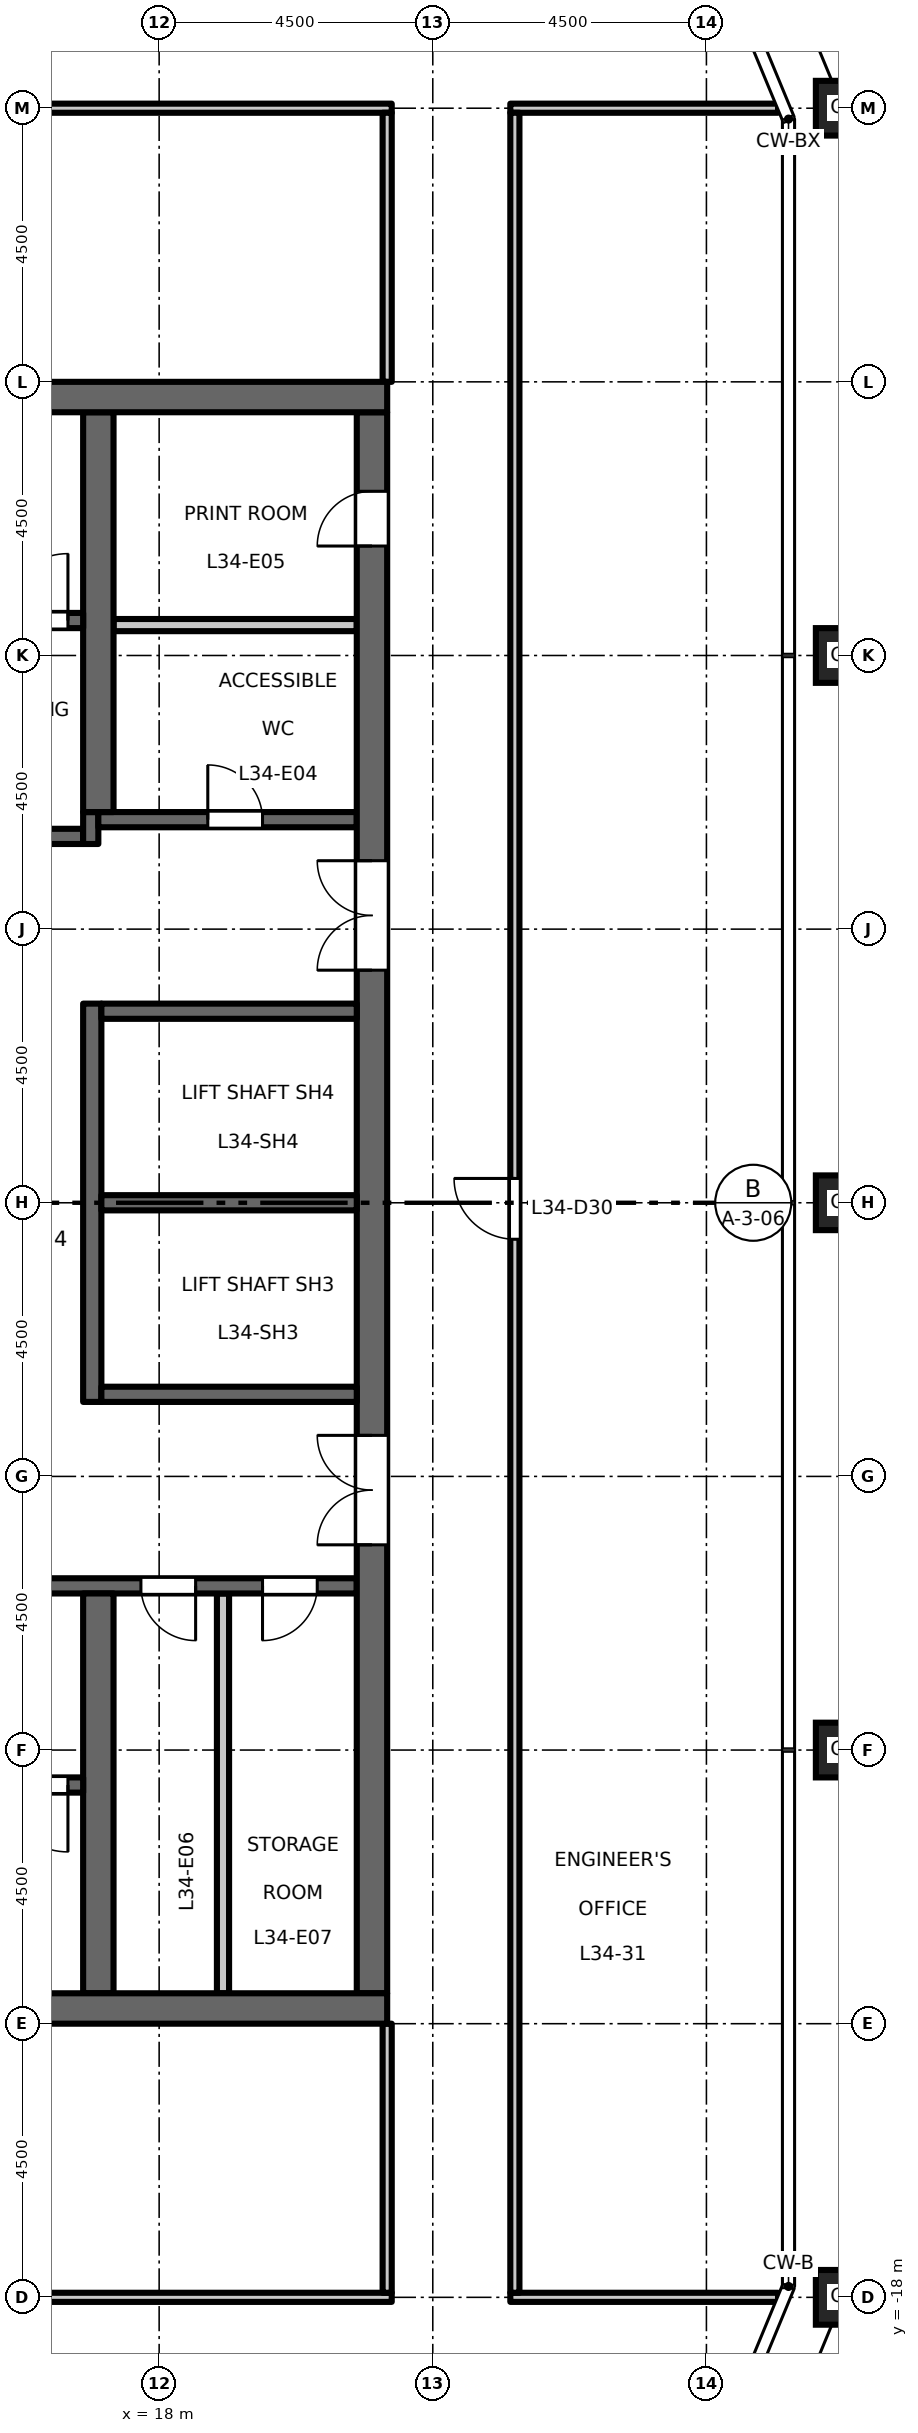
"""IFC4 building model, lengths in metres.
Left out: names, types, materials, properties, quantities, classifications, styles, units other than length and angle.
Written with IfcOpenShell. Run it as: python <this file> out.ifc"""

import sys

from ifc_helpers import new_model, si_unit, direction, frame, frame_2d, origin, origin_2d, place, context, subcontext, project, spatial, rectangle, hollow_rectangle, extrude, element, fill, save


model = new_model("IFC4")
c1 = context("Model", 3, precision=1e-05, world=origin(), true_north=direction((0.0, 1.0)))
c2 = subcontext(c1, "Body", "Model", "MODEL_VIEW")
j1 = project(units=[si_unit("LENGTHUNIT", "METRE"), si_unit("PLANEANGLEUNIT", "RADIAN")], contexts=[c1])
p1 = place(None, origin())
s1 = spatial("IfcSite", under=j1, at=p1, CompositionType="ELEMENT")
p2 = place(p1, origin())
s2 = spatial("IfcBuilding", under=s1, at=p2, CompositionType="ELEMENT")
p3 = place(p2, frame((0.0, 0.0, 158.7)))
s3 = spatial("IfcBuildingStorey", under=s2, at=p3, CompositionType="ELEMENT", Elevation=158.7)
for number, where, z_axis, x_axis in (
    (1, (29.25, -18.0, 0.0), (0.0, 0.0, 1.0), (1.0, 0.0, 0.0)),
    (2, (29.25, -9.0, 0.0), (0.0, 0.0, 1.0), (1.0, 0.0, 0.0)),
    (3, (29.25, 0.0, 0.0), (0.0, 0.0, 1.0), (1.0, 0.0, 0.0)),
    (4, (29.25, 9.0, 0.0), (0.0, 0.0, 1.0), (1.0, 0.0, 0.0)),
    (5, (29.25, 18.0, 0.0), (0.0, 0.0, 1.0), (1.0, 0.0, 0.0)),
):
    element("IfcColumn", number, at=place(p3, frame(where, z_axis=z_axis, x_axis=x_axis)), inside=s3, PredefinedType="COLUMN", context=c2, shape_type="SweptSolid", body=[
        extrude(hollow_rectangle(XDim=0.9, YDim=0.9, WallThickness=0.05, at=origin_2d()), origin(), (0.0, 0.0, 1.0), 4.5),
    ])
p4 = place(p3, frame((12.15, 6.025, 0.0), z_axis=(0.0, 0.0, 1.0), x_axis=(1.0, 0.0, 0.0)))
e6 = element("IfcWall", 6, at=p4, inside=s3, PredefinedType="SHEAR", context=c2, shape_type="SweptSolid", body=[
    extrude(rectangle(XDim=4.6, YDim=0.25, at=frame_2d((2.3, 0.0))), origin(), (0.0, 0.0, 1.0), 4.35),
])
p5 = place(p4, frame((1.8, 0.0, 0.0)))
e7 = element("IfcOpeningElement", 7, at=p5, cuts=e6, PredefinedType="OPENING", context=c2, shape_type="SweptSolid", body=[
    extrude(rectangle(XDim=1.0, YDim=2.1, at=frame_2d((0.5, 1.05))), frame((0.0, 0.135, 0.0), z_axis=(0.0, -1.0, 0.0), x_axis=(1.0, 0.0, 0.0)), (0.0, 0.0, 1.0), 0.27),
])
p6 = place(p3, frame((16.875, 5.9, 0.0), z_axis=(0.0, 0.0, 1.0), x_axis=(0.0, 1.0, 0.0)))
e8 = element("IfcWall", 8, at=p6, inside=s3, PredefinedType="SHEAR", context=c2, shape_type="SweptSolid", body=[
    extrude(rectangle(XDim=0.525, YDim=0.25, at=frame_2d((0.263, 0.0))), origin(), (0.0, 0.0, 1.0), 4.35),
])
p7 = place(p3, frame((17.0, 6.3, 0.0), z_axis=(0.0, 0.0, 1.0), x_axis=(1.0, 0.0, 0.0)))
e9 = element("IfcWall", 9, at=p7, inside=s3, PredefinedType="SHEAR", context=c2, shape_type="SweptSolid", body=[
    extrude(rectangle(XDim=4.25, YDim=0.25, at=frame_2d((2.125, 0.0))), origin(), (0.0, 0.0, 1.0), 4.35),
])
p8 = place(p7, frame((1.8, 0.0, 0.0)))
e10 = element("IfcOpeningElement", 10, at=p8, cuts=e9, PredefinedType="OPENING", context=c2, shape_type="SweptSolid", body=[
    extrude(rectangle(XDim=0.9, YDim=2.1, at=frame_2d((0.45, 1.05))), frame((0.0, 0.135, 0.0), z_axis=(0.0, -1.0, 0.0), x_axis=(1.0, 0.0, 0.0)), (0.0, 0.0, 1.0), 0.27),
])
p9 = place(p3, frame((12.15, -6.3, 0.0), z_axis=(0.0, 0.0, 1.0), x_axis=(1.0, 0.0, 0.0)))
e11 = element("IfcWall", 11, at=p9, inside=s3, PredefinedType="SHEAR", context=c2, shape_type="SweptSolid", body=[
    extrude(rectangle(XDim=9.1, YDim=0.25, at=frame_2d((4.55, 0.0))), origin(), (0.0, 0.0, 1.0), 4.35),
])
p10 = place(p9, frame((1.8, 0.0, 0.0)))
e12 = element("IfcOpeningElement", 12, at=p10, cuts=e11, PredefinedType="OPENING", context=c2, shape_type="SweptSolid", body=[
    extrude(rectangle(XDim=1.0, YDim=2.1, at=frame_2d((0.5, 1.05))), frame((0.0, 0.135, 0.0), z_axis=(0.0, -1.0, 0.0), x_axis=(1.0, 0.0, 0.0)), (0.0, 0.0, 1.0), 0.27),
])
p11 = place(p9, frame((5.55, 0.0, 0.0)))
e13 = element("IfcOpeningElement", 13, at=p11, cuts=e11, PredefinedType="OPENING", context=c2, shape_type="SweptSolid", body=[
    extrude(rectangle(XDim=0.9, YDim=2.1, at=frame_2d((0.45, 1.05))), frame((0.0, 0.135, 0.0), z_axis=(0.0, -1.0, 0.0), x_axis=(1.0, 0.0, 0.0)), (0.0, 0.0, 1.0), 0.27),
])
p12 = place(p9, frame((7.55, 0.0, 0.0)))
e14 = element("IfcOpeningElement", 14, at=p12, cuts=e11, PredefinedType="OPENING", context=c2, shape_type="SweptSolid", body=[
    extrude(rectangle(XDim=0.9, YDim=2.1, at=frame_2d((0.45, 1.05))), frame((0.0, 0.135, 0.0), z_axis=(0.0, -1.0, 0.0), x_axis=(1.0, 0.0, 0.0)), (0.0, 0.0, 1.0), 0.27),
])
p13 = place(p3, frame((21.5, -13.0, 0.0), z_axis=(0.0, 0.0, 1.0), x_axis=(0.0, 1.0, 0.0)))
e15 = element("IfcWall", 15, at=p13, inside=s3, PredefinedType="SHEAR", context=c2, shape_type="SweptSolid", body=[
    extrude(rectangle(XDim=26.0, YDim=0.5, at=frame_2d((13.0, 0.0))), origin(), (0.0, 0.0, 1.0), 4.35),
])
p14 = place(p13, frame((16.825, 0.0, 0.0)))
e16 = element("IfcOpeningElement", 16, at=p14, cuts=e15, PredefinedType="OPENING", context=c2, shape_type="SweptSolid", body=[
    extrude(rectangle(XDim=1.8, YDim=2.1, at=frame_2d((0.9, 1.05))), frame((0.0, 0.26, 0.0), z_axis=(0.0, -1.0, 0.0), x_axis=(1.0, 0.0, 0.0)), (0.0, 0.0, 1.0), 0.52),
])
p15 = place(p13, frame((7.375, 0.0, 0.0)))
e17 = element("IfcOpeningElement", 17, at=p15, cuts=e15, PredefinedType="OPENING", context=c2, shape_type="SweptSolid", body=[
    extrude(rectangle(XDim=1.8, YDim=2.1, at=frame_2d((0.9, 1.05))), frame((0.0, 0.26, 0.0), z_axis=(0.0, -1.0, 0.0), x_axis=(1.0, 0.0, 0.0)), (0.0, 0.0, 1.0), 0.52),
])
p16 = place(p13, frame((23.8, 0.0, 0.0)))
e18 = element("IfcOpeningElement", 18, at=p16, cuts=e15, PredefinedType="OPENING", context=c2, shape_type="SweptSolid", body=[
    extrude(rectangle(XDim=0.9, YDim=2.1, at=frame_2d((0.45, 1.05))), frame((0.0, 0.26, 0.0), z_axis=(0.0, -1.0, 0.0), x_axis=(1.0, 0.0, 0.0)), (0.0, 0.0, 1.0), 0.52),
])
p17 = place(p3, frame((17.25, 9.5, 0.0), z_axis=(0.0, 0.0, 1.0), x_axis=(1.0, 0.0, 0.0)))
e19 = element("IfcWall", 19, at=p17, inside=s3, PredefinedType="PARTITIONING", context=c2, shape_type="SweptSolid", body=[
    extrude(rectangle(XDim=4.0, YDim=0.2, at=frame_2d((2.0, 0.0))), origin(), (0.0, 0.0, 1.0), 4.35),
])
p18 = place(p3, frame((19.05, -13.0, 0.0), z_axis=(0.0, 0.0, 1.0), x_axis=(0.0, 1.0, 0.0)))
e20 = element("IfcWall", 20, at=p18, inside=s3, PredefinedType="PARTITIONING", context=c2, shape_type="SweptSolid", body=[
    extrude(rectangle(XDim=6.575, YDim=0.2, at=frame_2d((3.288, 0.0))), origin(), (0.0, 0.0, 1.0), 4.35),
])
p19 = place(p3, frame((16.9, -3.275, 0.0), z_axis=(0.0, 0.0, 1.0), x_axis=(0.0, 1.0, 0.0)))
e21 = element("IfcWall", 21, at=p19, inside=s3, PredefinedType="SHEAR", context=c2, shape_type="SweptSolid", body=[
    extrude(rectangle(XDim=6.55, YDim=0.3, at=frame_2d((3.275, 0.0))), origin(), (0.0, 0.0, 1.0), 4.35),
])
for number, where, z_axis, x_axis in (
    (22, (17.05, 0.0, 0.0), (0.0, 0.0, 1.0), (1.0, 0.0, 0.0)),
    (23, (17.05, 3.15, 0.0), (0.0, 0.0, 1.0), (1.0, 0.0, 0.0)),
    (24, (17.05, -3.15, 0.0), (0.0, 0.0, 1.0), (1.0, 0.0, 0.0)),
):
    element("IfcWall", number, at=place(p3, frame(where, z_axis=z_axis, x_axis=x_axis)), inside=s3, PredefinedType="SHEAR", context=c2, shape_type="SweptSolid", body=[
        extrude(rectangle(XDim=4.2, YDim=0.25, at=frame_2d((2.1, 0.0))), origin(), (0.0, 0.0, 1.0), 4.35),
    ])
for number, where, z_axis, x_axis in (
    (25, (17.0, 6.425, 0.0), (0.0, 0.0, 1.0), (0.0, 1.0, 0.0)),
    (26, (17.0, -13.0, 0.0), (0.0, 0.0, 1.0), (0.0, 1.0, 0.0)),
):
    element("IfcWall", number, at=place(p3, frame(where, z_axis=z_axis, x_axis=x_axis)), inside=s3, PredefinedType="SHEAR", context=c2, shape_type="SweptSolid", body=[
        extrude(rectangle(XDim=6.575, YDim=0.5, at=frame_2d((3.288, 0.0))), origin(), (0.0, 0.0, 1.0), 4.35),
    ])
p20 = place(p3, frame((8.75, 9.575, 0.0), z_axis=(0.0, 0.0, 1.0), x_axis=(1.0, 0.0, 0.0)))
e27 = element("IfcWall", 27, at=p20, inside=s3, PredefinedType="SHEAR", context=c2, shape_type="SweptSolid", body=[
    extrude(rectangle(XDim=8.0, YDim=0.25, at=frame_2d((4.0, 0.0))), origin(), (0.0, 0.0, 1.0), 4.35),
])
p21 = place(p20, frame((6.65, 0.0, 0.0)))
e28 = element("IfcOpeningElement", 28, at=p21, cuts=e27, PredefinedType="OPENING", context=c2, shape_type="SweptSolid", body=[
    extrude(rectangle(XDim=1.1, YDim=2.1, at=frame_2d((0.55, 1.05))), frame((0.0, 0.135, 0.0), z_axis=(0.0, -1.0, 0.0), x_axis=(1.0, 0.0, 0.0)), (0.0, 0.0, 1.0), 0.27),
])
p22 = place(p3, frame((8.75, -9.575, 0.0), z_axis=(0.0, 0.0, 1.0), x_axis=(1.0, 0.0, 0.0)))
e29 = element("IfcWall", 29, at=p22, inside=s3, PredefinedType="SHEAR", context=c2, shape_type="SweptSolid", body=[
    extrude(rectangle(XDim=8.0, YDim=0.25, at=frame_2d((4.0, 0.0))), origin(), (0.0, 0.0, 1.0), 4.35),
])
p23 = place(p22, frame((6.65, 0.0, 0.0)))
e30 = element("IfcOpeningElement", 30, at=p23, cuts=e29, PredefinedType="OPENING", context=c2, shape_type="SweptSolid", body=[
    extrude(rectangle(XDim=1.1, YDim=2.1, at=frame_2d((0.55, 1.05))), frame((0.0, 0.135, 0.0), z_axis=(0.0, -1.0, 0.0), x_axis=(1.0, 0.0, 0.0)), (0.0, 0.0, 1.0), 0.27),
])
for number, where, z_axis, x_axis in (
    (31, (8.25, 13.25, 0.0), (0.0, 0.0, 1.0), (1.0, 0.0, 0.0)),
    (32, (8.25, -13.25, 0.0), (0.0, 0.0, 1.0), (1.0, 0.0, 0.0)),
):
    element("IfcWall", number, at=place(p3, frame(where, z_axis=z_axis, x_axis=x_axis)), inside=s3, PredefinedType="SHEAR", context=c2, shape_type="SweptSolid", body=[
        extrude(rectangle(XDim=13.5, YDim=0.5, at=frame_2d((6.75, 0.0))), origin(), (0.0, 0.0, 1.0), 4.35),
    ])
p24 = place(p3, frame((-21.825, -18.0, 0.0), z_axis=(0.0, 0.0, 1.0), x_axis=(1.0, 0.0, 0.0)))
e33 = element("IfcWall", 33, at=p24, inside=s3, PredefinedType="PARTITIONING", context=c2, shape_type="SweptSolid", body=[
    extrude(rectangle(XDim=43.65, YDim=0.15, at=frame_2d((21.825, 0.0))), origin(), (0.0, 0.0, 1.0), 4.35),
])
p25 = place(p24, frame((21.425, 0.0, 0.0)))
e34 = element("IfcOpeningElement", 34, at=p25, cuts=e33, PredefinedType="OPENING", context=c2, shape_type="SweptSolid", body=[
    extrude(rectangle(XDim=1.0, YDim=2.1, at=frame_2d((0.5, 1.05))), frame((0.0, 0.085, 0.0), z_axis=(0.0, -1.0, 0.0), x_axis=(1.0, 0.0, 0.0)), (0.0, 0.0, 1.0), 0.17),
])
p26 = place(p24, frame((6.425, 0.0, 0.0)))
e35 = element("IfcOpeningElement", 35, at=p26, cuts=e33, PredefinedType="OPENING", context=c2, shape_type="SweptSolid", body=[
    extrude(rectangle(XDim=1.0, YDim=2.1, at=frame_2d((0.5, 1.05))), frame((0.0, 0.085, 0.0), z_axis=(0.0, -1.0, 0.0), x_axis=(1.0, 0.0, 0.0)), (0.0, 0.0, 1.0), 0.17),
])
p27 = place(p24, frame((36.425, 0.0, 0.0)))
e36 = element("IfcOpeningElement", 36, at=p27, cuts=e33, PredefinedType="OPENING", context=c2, shape_type="SweptSolid", body=[
    extrude(rectangle(XDim=1.0, YDim=2.1, at=frame_2d((0.5, 1.05))), frame((0.0, 0.085, 0.0), z_axis=(0.0, -1.0, 0.0), x_axis=(1.0, 0.0, 0.0)), (0.0, 0.0, 1.0), 0.17),
])
p28 = place(p3, frame((23.775, -18.0, 0.0), z_axis=(0.0, 0.0, 1.0), x_axis=(1.0, 0.0, 0.0)))
e37 = element("IfcWall", 37, at=p28, inside=s3, PredefinedType="PARTITIONING", context=c2, shape_type="SweptSolid", body=[
    extrude(rectangle(XDim=4.403, YDim=0.15, at=frame_2d((2.202, 0.0))), origin(), (0.0, 0.0, 1.0), 4.35),
])
p29 = place(p3, frame((0.0, 18.0, 0.0), z_axis=(0.0, 0.0, 1.0), x_axis=(1.0, 0.0, 0.0)))
e38 = element("IfcWall", 38, at=p29, inside=s3, PredefinedType="PARTITIONING", context=c2, shape_type="SweptSolid", body=[
    extrude(rectangle(XDim=21.825, YDim=0.15, at=frame_2d((10.913, 0.0))), origin(), (0.0, 0.0, 1.0), 4.35),
])
p30 = place(p29, frame((3.65, 0.0, 0.0)))
e39 = element("IfcOpeningElement", 39, at=p30, cuts=e38, PredefinedType="OPENING", context=c2, shape_type="SweptSolid", body=[
    extrude(rectangle(XDim=1.0, YDim=2.1, at=frame_2d((0.5, 1.05))), frame((0.0, 0.085, 0.0), z_axis=(0.0, -1.0, 0.0), x_axis=(1.0, 0.0, 0.0)), (0.0, 0.0, 1.0), 0.17),
])
p31 = place(p29, frame((14.4, 0.0, 0.0)))
e40 = element("IfcOpeningElement", 40, at=p31, cuts=e38, PredefinedType="OPENING", context=c2, shape_type="SweptSolid", body=[
    extrude(rectangle(XDim=1.0, YDim=2.1, at=frame_2d((0.5, 1.05))), frame((0.0, 0.085, 0.0), z_axis=(0.0, -1.0, 0.0), x_axis=(1.0, 0.0, 0.0)), (0.0, 0.0, 1.0), 0.17),
])
p32 = place(p3, frame((23.775, 18.0, 0.0), z_axis=(0.0, 0.0, 1.0), x_axis=(1.0, 0.0, 0.0)))
e41 = element("IfcWall", 41, at=p32, inside=s3, PredefinedType="PARTITIONING", context=c2, shape_type="SweptSolid", body=[
    extrude(rectangle(XDim=4.403, YDim=0.15, at=frame_2d((2.202, 0.0))), origin(), (0.0, 0.0, 1.0), 4.35),
])
for number, where, z_axis, x_axis in (
    (42, (21.75, -17.925, 0.0), (0.0, 0.0, 1.0), (0.0, 1.0, 0.0)),
    (43, (21.75, 13.5, 0.0), (0.0, 0.0, 1.0), (0.0, 1.0, 0.0)),
):
    element("IfcWall", number, at=place(p3, frame(where, z_axis=z_axis, x_axis=x_axis)), inside=s3, PredefinedType="PARTITIONING", context=c2, shape_type="SweptSolid", body=[
        extrude(rectangle(XDim=4.425, YDim=0.15, at=frame_2d((2.212, 0.0))), origin(), (0.0, 0.0, 1.0), 4.35),
    ])
p33 = place(p3, frame((23.85, -17.925, 0.0), z_axis=(0.0, 0.0, 1.0), x_axis=(0.0, 1.0, 0.0)))
e44 = element("IfcWall", 44, at=p33, inside=s3, PredefinedType="PARTITIONING", context=c2, shape_type="SweptSolid", body=[
    extrude(rectangle(XDim=35.85, YDim=0.15, at=frame_2d((17.925, 0.0))), origin(), (0.0, 0.0, 1.0), 4.35),
])
p34 = place(p33, frame((17.325, 0.0, 0.0)))
e45 = element("IfcOpeningElement", 45, at=p34, cuts=e44, PredefinedType="OPENING", context=c2, shape_type="SweptSolid", body=[
    extrude(rectangle(XDim=1.0, YDim=2.1, at=frame_2d((0.5, 1.05))), frame((0.0, 0.085, 0.0), z_axis=(0.0, -1.0, 0.0), x_axis=(1.0, 0.0, 0.0)), (0.0, 0.0, 1.0), 0.17),
])
p35 = place(p21, origin())
e46 = element("IfcDoor", 46, at=p35, inside=s3, OperationType="SINGLE_SWING_LEFT", PredefinedType="DOOR", context=c2, shape_type="SweptSolid", body=[
    extrude(rectangle(XDim=1.1, YDim=2.1, at=frame_2d((0.55, 1.05))), frame((0.0, 0.025, 0.0), z_axis=(0.0, -1.0, 0.0), x_axis=(1.0, 0.0, 0.0)), (0.0, 0.0, 1.0), 0.05),
])
fill(e28, e46)
p36 = place(p23, origin())
e47 = element("IfcDoor", 47, at=p36, inside=s3, OperationType="SINGLE_SWING_RIGHT", PredefinedType="DOOR", context=c2, shape_type="SweptSolid", body=[
    extrude(rectangle(XDim=1.1, YDim=2.1, at=frame_2d((0.55, 1.05))), frame((0.0, 0.025, 0.0), z_axis=(0.0, -1.0, 0.0), x_axis=(1.0, 0.0, 0.0)), (0.0, 0.0, 1.0), 0.05),
])
fill(e30, e47)
p37 = place(p14, origin())
e48 = element("IfcDoor", 48, at=p37, inside=s3, OperationType="DOUBLE_DOOR_DOUBLE_SWING", PredefinedType="DOOR", context=c2, shape_type="SweptSolid", body=[
    extrude(rectangle(XDim=1.8, YDim=2.1, at=frame_2d((0.9, 1.05))), frame((0.0, 0.025, 0.0), z_axis=(0.0, -1.0, 0.0), x_axis=(1.0, 0.0, 0.0)), (0.0, 0.0, 1.0), 0.05),
])
fill(e16, e48)
p38 = place(p15, origin())
e49 = element("IfcDoor", 49, at=p38, inside=s3, OperationType="DOUBLE_DOOR_DOUBLE_SWING", PredefinedType="DOOR", context=c2, shape_type="SweptSolid", body=[
    extrude(rectangle(XDim=1.8, YDim=2.1, at=frame_2d((0.9, 1.05))), frame((0.0, 0.025, 0.0), z_axis=(0.0, -1.0, 0.0), x_axis=(1.0, 0.0, 0.0)), (0.0, 0.0, 1.0), 0.05),
])
fill(e17, e49)
p39 = place(p8, origin())
e50 = element("IfcDoor", 50, at=p39, inside=s3, OperationType="SINGLE_SWING_RIGHT", PredefinedType="DOOR", context=c2, shape_type="SweptSolid", body=[
    extrude(rectangle(XDim=0.9, YDim=2.1, at=frame_2d((0.45, 1.05))), frame((0.0, 0.025, 0.0), z_axis=(0.0, -1.0, 0.0), x_axis=(1.0, 0.0, 0.0)), (0.0, 0.0, 1.0), 0.05),
])
fill(e10, e50)
p40 = place(p16, origin())
e51 = element("IfcDoor", 51, at=p40, inside=s3, OperationType="SINGLE_SWING_RIGHT", PredefinedType="DOOR", context=c2, shape_type="SweptSolid", body=[
    extrude(rectangle(XDim=0.9, YDim=2.1, at=frame_2d((0.45, 1.05))), frame((0.0, 0.025, 0.0), z_axis=(0.0, -1.0, 0.0), x_axis=(1.0, 0.0, 0.0)), (0.0, 0.0, 1.0), 0.05),
])
fill(e18, e51)
p41 = place(p11, origin())
e52 = element("IfcDoor", 52, at=p41, inside=s3, OperationType="SINGLE_SWING_RIGHT", PredefinedType="DOOR", context=c2, shape_type="SweptSolid", body=[
    extrude(rectangle(XDim=0.9, YDim=2.1, at=frame_2d((0.45, 1.05))), frame((0.0, 0.025, 0.0), z_axis=(0.0, -1.0, 0.0), x_axis=(1.0, 0.0, 0.0)), (0.0, 0.0, 1.0), 0.05),
])
fill(e13, e52)
p42 = place(p12, origin())
e53 = element("IfcDoor", 53, at=p42, inside=s3, OperationType="SINGLE_SWING_LEFT", PredefinedType="DOOR", context=c2, shape_type="SweptSolid", body=[
    extrude(rectangle(XDim=0.9, YDim=2.1, at=frame_2d((0.45, 1.05))), frame((0.0, 0.025, 0.0), z_axis=(0.0, -1.0, 0.0), x_axis=(1.0, 0.0, 0.0)), (0.0, 0.0, 1.0), 0.05),
])
fill(e14, e53)
p43 = place(p34, origin())
e54 = element("IfcDoor", 54, at=p43, inside=s3, OperationType="SINGLE_SWING_RIGHT", PredefinedType="DOOR", context=c2, shape_type="SweptSolid", body=[
    extrude(rectangle(XDim=1.0, YDim=2.1, at=frame_2d((0.5, 1.05))), frame((0.0, 0.025, 0.0), z_axis=(0.0, -1.0, 0.0), x_axis=(1.0, 0.0, 0.0)), (0.0, 0.0, 1.0), 0.05),
])
fill(e45, e54)
save(model, sys.argv[1])
